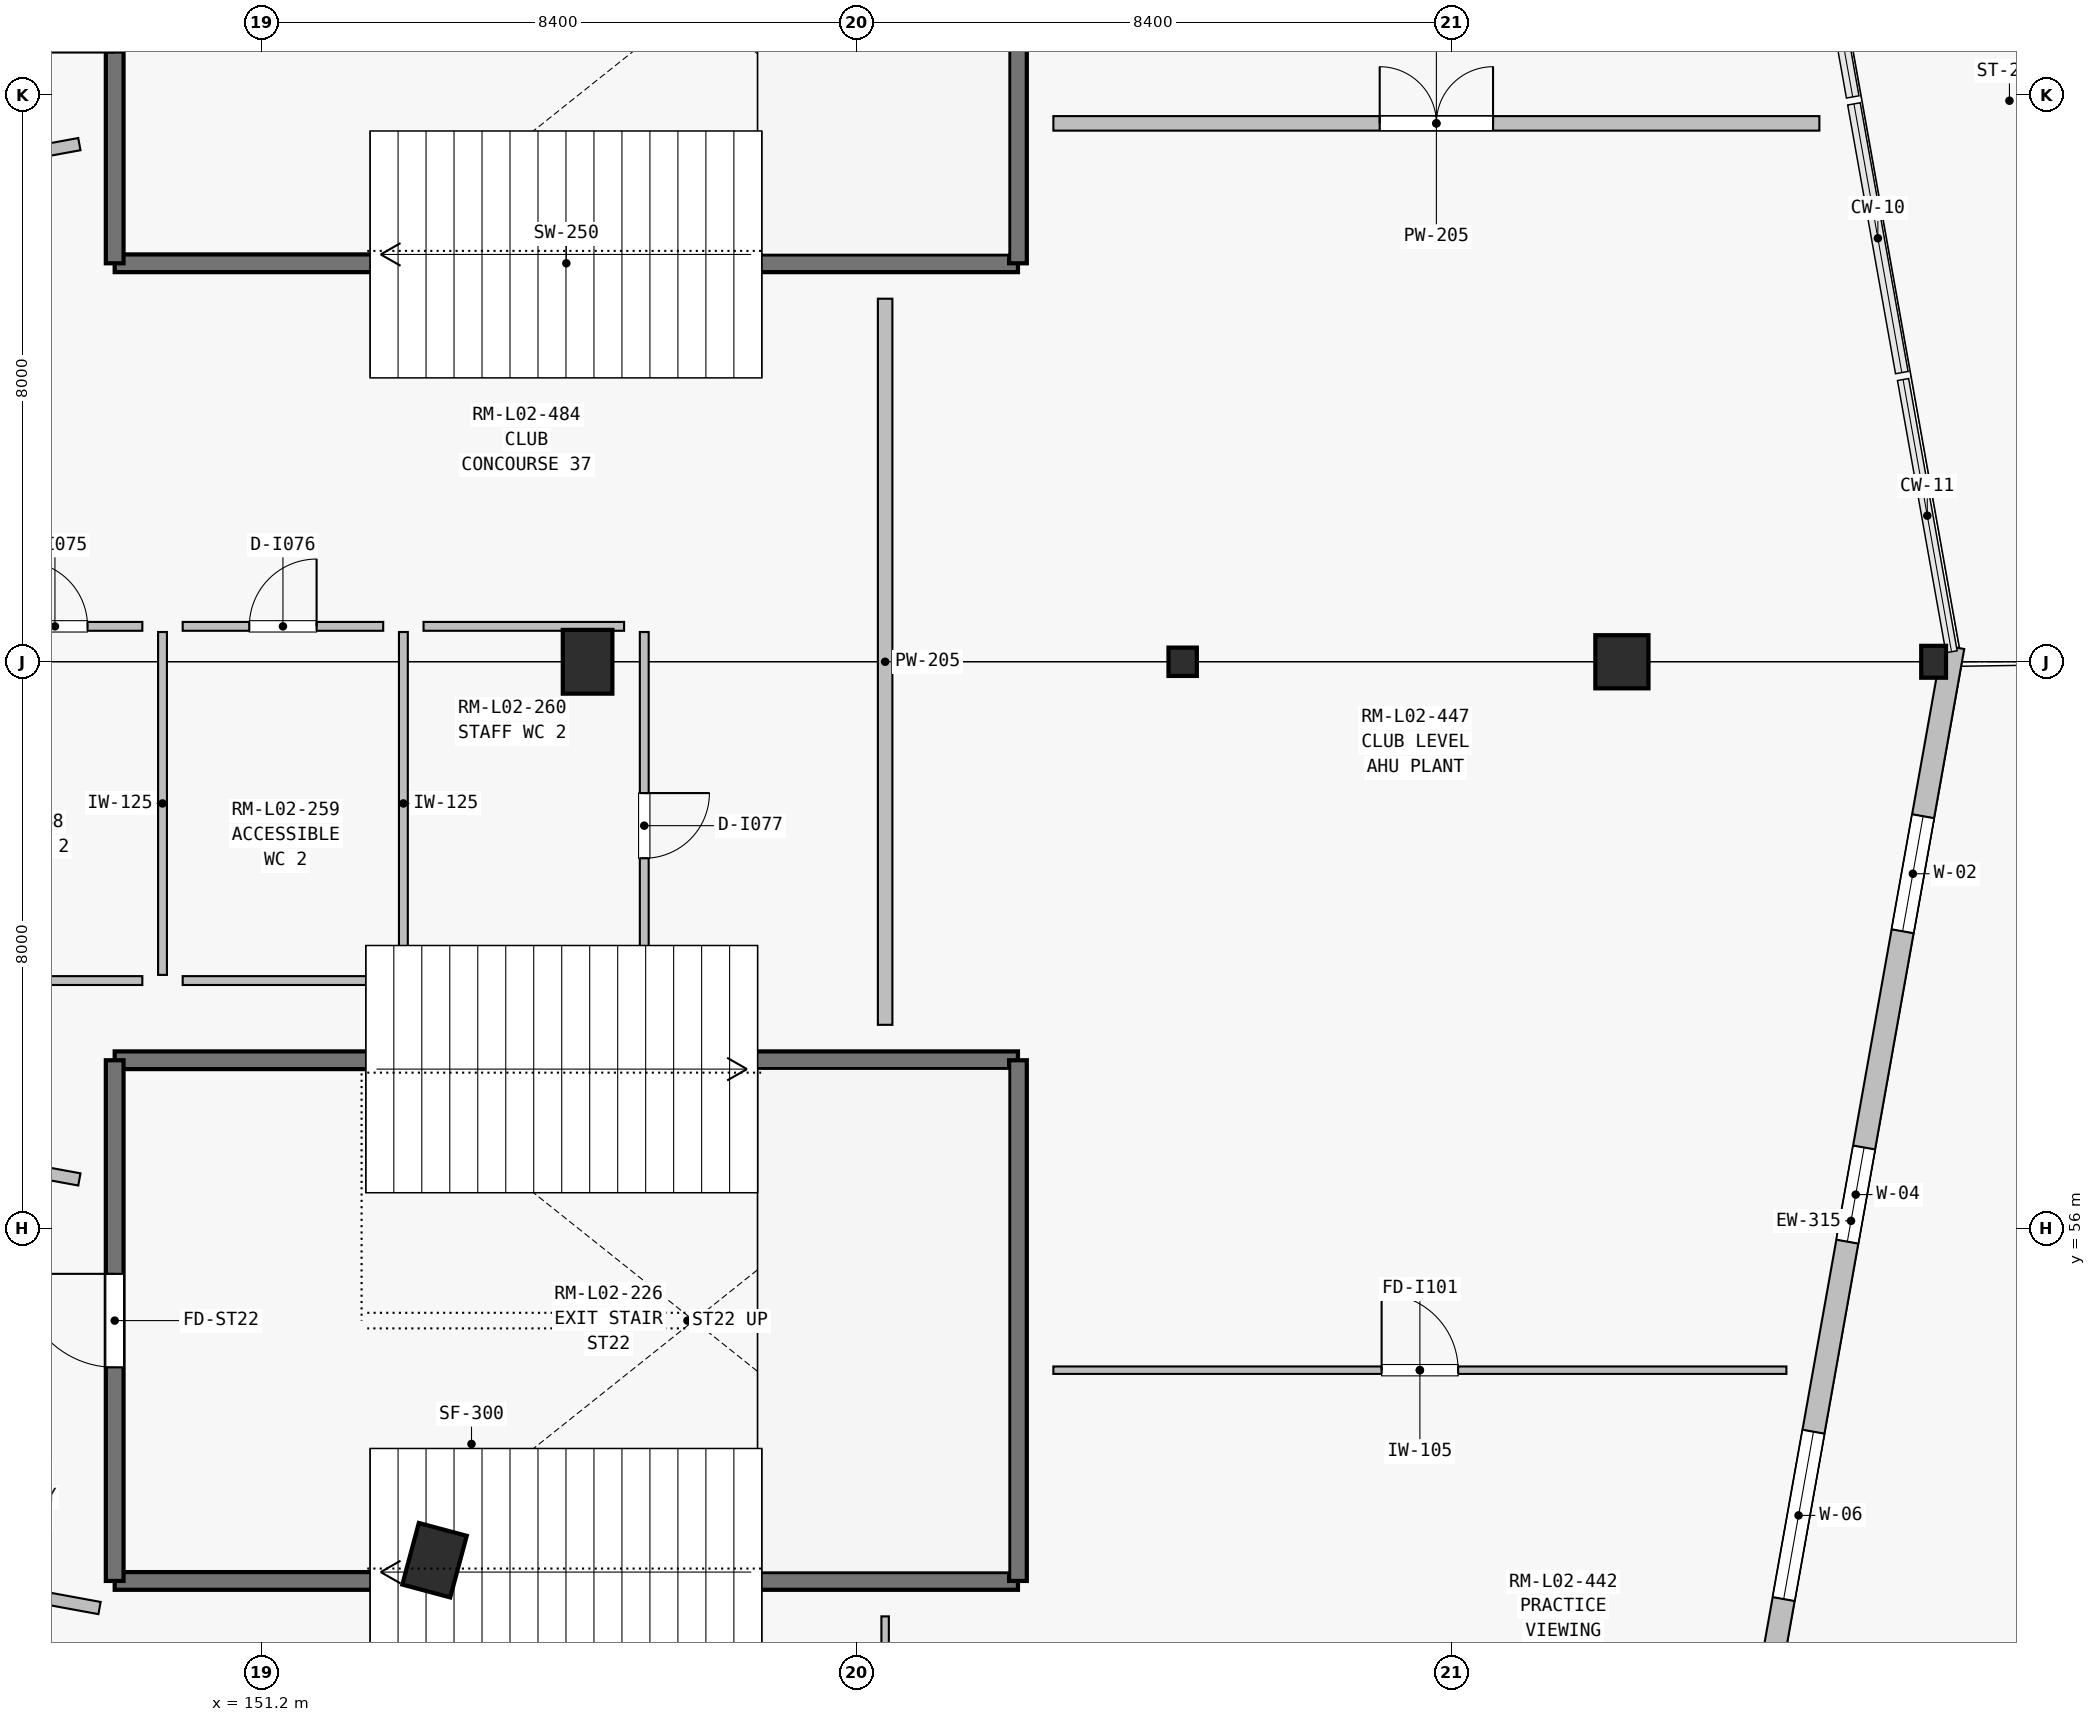
"""IFC4 building model, lengths in metres.
Left out: names, types, materials, properties, quantities, classifications, styles, units other than length and angle.
Written with IfcOpenShell. Run it as: python <this file> out.ifc"""

import sys

from ifc_helpers import new_model, si_unit, direction, frame, frame_2d, origin, origin_2d, place, context, subcontext, project, spatial, rectangle, i_section, extrude, element, fill, save


model = new_model("IFC4")
c1 = context("Model", 3, precision=1e-05, world=origin(), true_north=direction((0.0, 1.0)))
c2 = subcontext(c1, "Body", "Model", "MODEL_VIEW")
j1 = project(units=[si_unit("LENGTHUNIT", "METRE"), si_unit("PLANEANGLEUNIT", "RADIAN")], contexts=[c1])
p1 = place(None, origin())
s1 = spatial("IfcSite", under=j1, at=p1, CompositionType="ELEMENT")
p2 = place(p1, origin())
s2 = spatial("IfcBuilding", under=s1, at=p2, CompositionType="ELEMENT")
p3 = place(p2, frame((0.0, 0.0, 9.9)))
s3 = spatial("IfcBuildingStorey", under=s2, at=p3, CompositionType="ELEMENT", Elevation=9.9)
for number, where, z_axis, x_axis in (
    (1, (155.8, 64.0, 0.0), (0.0, 0.0, 1.0), (1.0, 0.0, 0.0)),
    (2, (153.64, 51.318, 0.0), (0.0, 0.0, 1.0), (0.966, -0.259, 0.0)),
):
    element("IfcColumn", number, at=place(p3, frame(where, z_axis=z_axis, x_axis=x_axis)), inside=s3, PredefinedType="COLUMN", context=c2, shape_type="SweptSolid", body=[
        extrude(rectangle(XDim=0.7, YDim=0.9, at=origin_2d()), origin(), (0.0, 0.0, 1.0), 4.5),
    ])
p4 = place(p3, frame((164.2, 64.0, 0.0), z_axis=(0.0, 0.0, 1.0), x_axis=(1.0, 0.0, 0.0)))
e3 = element("IfcColumn", 3, at=p4, inside=s3, PredefinedType="COLUMN", context=c2, shape_type="SweptSolid", body=[
    extrude(i_section(OverallWidth=0.4, OverallDepth=0.4, WebThickness=0.016, FlangeThickness=0.028, at=origin_2d()), origin(), (0.0, 0.0, 1.0), 4.5),
])
p5 = place(p3, frame((170.4, 64.0, 0.0), z_axis=(0.0, 0.0, 1.0), x_axis=(1.0, 0.0, 0.0)))
e4 = element("IfcColumn", 4, at=p5, inside=s3, PredefinedType="COLUMN", context=c2, shape_type="SweptSolid", body=[
    extrude(rectangle(XDim=0.75, YDim=0.75, at=origin_2d()), origin(), (0.0, 0.0, 1.0), 4.5),
])
p6 = place(p3, frame((174.8, 64.0, 0.0), z_axis=(0.0, 0.0, 1.0), x_axis=(1.0, 0.0, 0.0)))
e5 = element("IfcColumn", 5, at=p6, inside=s3, PredefinedType="PILASTER", context=c2, shape_type="SweptSolid", body=[
    extrude(rectangle(XDim=0.35, YDim=0.45, at=origin_2d()), origin(), (0.0, 0.0, 1.0), 5.45),
])
p7 = place(p3, frame((175.077, 64.208, 0.0), z_axis=(0.0, 0.0, 1.0), x_axis=(-0.175348469708, -0.984506431757, 0.0)))
e6 = element("IfcWall", 6, at=p7, inside=s3, PredefinedType="SOLIDWALL", context=c2, shape_type="SweptSolid", body=[
    extrude(rectangle(XDim=16.454, YDim=0.315, at=frame_2d((8.227, 0.0))), origin(), (0.0, 0.0, 1.0), 4.26),
])
p8 = place(p7, frame((2.425, 0.0, 0.75)))
e7 = element("IfcOpeningElement", 7, at=p8, cuts=e6, PredefinedType="OPENING", context=c2, shape_type="SweptSolid", body=[
    extrude(rectangle(XDim=1.65, YDim=2.4, at=frame_2d((0.825, 1.2))), frame((0.0, 0.167, 0.0), z_axis=(0.0, -1.0, 0.0), x_axis=(1.0, 0.0, 0.0)), (0.0, 0.0, 1.0), 0.335),
])
p9 = place(p7, frame((7.175, 0.0, 0.75)))
e8 = element("IfcOpeningElement", 8, at=p9, cuts=e6, PredefinedType="OPENING", context=c2, shape_type="SweptSolid", body=[
    extrude(rectangle(XDim=1.35, YDim=2.3, at=frame_2d((0.675, 1.15))), frame((0.0, 0.167, 0.0), z_axis=(0.0, -1.0, 0.0), x_axis=(1.0, 0.0, 0.0)), (0.0, 0.0, 1.0), 0.335),
])
p10 = place(p7, frame((11.25, 0.0, 0.9)))
e9 = element("IfcOpeningElement", 9, at=p10, cuts=e6, PredefinedType="OPENING", context=c2, shape_type="SweptSolid", body=[
    extrude(rectangle(XDim=2.4, YDim=2.1, at=frame_2d((1.2, 1.05))), frame((0.0, 0.167, 0.0), z_axis=(0.0, -1.0, 0.0), x_axis=(1.0, 0.0, 0.0)), (0.0, 0.0, 1.0), 0.335),
])
p11 = place(p3, frame((149.125, 69.625, 0.0), z_axis=(0.0, 0.0, 1.0), x_axis=(1.0, 0.0, 0.0)))
e10 = element("IfcWall", 10, at=p11, inside=s3, PredefinedType="SHEAR", context=c2, shape_type="SweptSolid", body=[
    extrude(rectangle(XDim=12.75, YDim=0.25, at=frame_2d((6.375, 0.0))), origin(), (0.0, 0.0, 1.0), 4.5),
])
p12 = place(p3, frame((149.125, 69.625, 0.0), z_axis=(0.0, 0.0, 1.0), x_axis=(0.0, 1.0, 0.0)))
e11 = element("IfcWall", 11, at=p12, inside=s3, PredefinedType="SHEAR", context=c2, shape_type="SweptSolid", body=[
    extrude(rectangle(XDim=7.35, YDim=0.25, at=frame_2d((3.675, 0.0))), origin(), (0.0, 0.0, 1.0), 4.5),
])
p13 = place(p12, frame((2.975, 0.0, 0.0)))
e12 = element("IfcOpeningElement", 12, at=p13, cuts=e11, PredefinedType="OPENING", context=c2, shape_type="SweptSolid", body=[
    extrude(rectangle(XDim=1.4, YDim=2.2, at=frame_2d((0.7, 1.1))), frame((0.0, 0.135, 0.0), z_axis=(0.0, -1.0, 0.0), x_axis=(1.0, 0.0, 0.0)), (0.0, 0.0, 1.0), 0.27),
])
p14 = place(p3, frame((161.875, 69.625, 0.0), z_axis=(0.0, 0.0, 1.0), x_axis=(0.0, 1.0, 0.0)))
e13 = element("IfcWall", 13, at=p14, inside=s3, PredefinedType="SHEAR", context=c2, shape_type="SweptSolid", body=[
    extrude(rectangle(XDim=7.35, YDim=0.25, at=frame_2d((3.675, 0.0))), origin(), (0.0, 0.0, 1.0), 4.5),
])
for number, where, z_axis, x_axis in (
    (14, (149.125, 51.025, 0.0), (0.0, 0.0, 1.0), (1.0, 0.0, 0.0)),
    (15, (149.125, 58.375, 0.0), (0.0, 0.0, 1.0), (1.0, 0.0, 0.0)),
):
    element("IfcWall", number, at=place(p3, frame(where, z_axis=z_axis, x_axis=x_axis)), inside=s3, PredefinedType="SHEAR", context=c2, shape_type="SweptSolid", body=[
        extrude(rectangle(XDim=12.75, YDim=0.25, at=frame_2d((6.375, 0.0))), origin(), (0.0, 0.0, 1.0), 4.5),
    ])
p15 = place(p3, frame((149.125, 51.025, 0.0), z_axis=(0.0, 0.0, 1.0), x_axis=(0.0, 1.0, 0.0)))
e16 = element("IfcWall", 16, at=p15, inside=s3, PredefinedType="SHEAR", context=c2, shape_type="SweptSolid", body=[
    extrude(rectangle(XDim=7.35, YDim=0.25, at=frame_2d((3.675, 0.0))), origin(), (0.0, 0.0, 1.0), 4.5),
])
p16 = place(p15, frame((3.015, 0.0, 0.0)))
e17 = element("IfcOpeningElement", 17, at=p16, cuts=e16, PredefinedType="OPENING", context=c2, shape_type="SweptSolid", body=[
    extrude(rectangle(XDim=1.32, YDim=2.2, at=frame_2d((0.66, 1.1))), frame((0.0, 0.135, 0.0), z_axis=(0.0, -1.0, 0.0), x_axis=(1.0, 0.0, 0.0)), (0.0, 0.0, 1.0), 0.27),
])
p17 = place(p3, frame((161.875, 51.025, 0.0), z_axis=(0.0, 0.0, 1.0), x_axis=(0.0, 1.0, 0.0)))
e18 = element("IfcWall", 18, at=p17, inside=s3, PredefinedType="SHEAR", context=c2, shape_type="SweptSolid", body=[
    extrude(rectangle(XDim=7.35, YDim=0.25, at=frame_2d((3.675, 0.0))), origin(), (0.0, 0.0, 1.0), 4.5),
])
p18 = place(p3, frame((149.8, 64.42, 0.0), z_axis=(0.0, 0.0, 1.0), x_axis=(0.0, -1.0, 0.0)))
e19 = element("IfcWall", 19, at=p18, inside=s3, PredefinedType="PARTITIONING", context=c2, shape_type="SweptSolid", body=[
    extrude(rectangle(XDim=4.84, YDim=0.125, at=frame_2d((2.42, 0.0))), origin(), (0.0, 0.0, 1.0), 3.627),
])
p19 = place(p3, frame((149.515, 59.5, 0.0), z_axis=(0.0, 0.0, 1.0), x_axis=(-1.0, 0.0, 0.0)))
e20 = element("IfcWall", 20, at=p19, inside=s3, PredefinedType="PARTITIONING", context=c2, shape_type="SweptSolid", body=[
    extrude(rectangle(XDim=3.83, YDim=0.125, at=frame_2d((1.915, 0.0))), origin(), (0.0, 0.0, 1.0), 3.245),
])
p20 = place(p3, frame((145.62, 64.5, 0.0), z_axis=(0.0, 0.0, 1.0), x_axis=(1.0, 0.0, 0.0)))
e21 = element("IfcWall", 21, at=p20, inside=s3, PredefinedType="PARTITIONING", context=c2, shape_type="SweptSolid", body=[
    extrude(rectangle(XDim=3.895, YDim=0.125, at=frame_2d((1.948, 0.0))), origin(), (0.0, 0.0, 1.0), 3.245),
])
p21 = place(p20, frame((2.202, 0.0, 0.0)))
e22 = element("IfcOpeningElement", 22, at=p21, cuts=e21, PredefinedType="OPENING", context=c2, shape_type="SweptSolid", body=[
    extrude(rectangle(XDim=0.92, YDim=2.1, at=frame_2d((0.46, 1.05))), frame((0.0, 0.073, 0.0), z_axis=(0.0, -1.0, 0.0), x_axis=(1.0, 0.0, 0.0)), (0.0, 0.0, 1.0), 0.145),
])
p22 = place(p3, frame((153.2, 64.42, 0.0), z_axis=(0.0, 0.0, 1.0), x_axis=(0.0, -1.0, 0.0)))
e23 = element("IfcWall", 23, at=p22, inside=s3, PredefinedType="PARTITIONING", context=c2, shape_type="SweptSolid", body=[
    extrude(rectangle(XDim=4.84, YDim=0.125, at=frame_2d((2.42, 0.0))), origin(), (0.0, 0.0, 1.0), 3.627),
])
p23 = place(p3, frame((152.915, 59.5, 0.0), z_axis=(0.0, 0.0, 1.0), x_axis=(-1.0, 0.0, 0.0)))
e24 = element("IfcWall", 24, at=p23, inside=s3, PredefinedType="PARTITIONING", context=c2, shape_type="SweptSolid", body=[
    extrude(rectangle(XDim=2.831, YDim=0.125, at=frame_2d((1.415, 0.0))), origin(), (0.0, 0.0, 1.0), 4.18),
])
p24 = place(p3, frame((150.085, 64.5, 0.0), z_axis=(0.0, 0.0, 1.0), x_axis=(1.0, 0.0, 0.0)))
e25 = element("IfcWall", 25, at=p24, inside=s3, PredefinedType="PARTITIONING", context=c2, shape_type="SweptSolid", body=[
    extrude(rectangle(XDim=2.831, YDim=0.125, at=frame_2d((1.415, 0.0))), origin(), (0.0, 0.0, 1.0), 4.2),
])
p25 = place(p24, frame((0.94, 0.0, 0.0)))
e26 = element("IfcOpeningElement", 26, at=p25, cuts=e25, PredefinedType="OPENING", context=c2, shape_type="SweptSolid", body=[
    extrude(rectangle(XDim=0.95, YDim=2.1, at=frame_2d((0.475, 1.05))), frame((0.0, 0.073, 0.0), z_axis=(0.0, -1.0, 0.0), x_axis=(1.0, 0.0, 0.0)), (0.0, 0.0, 1.0), 0.145),
])
p26 = place(p3, frame((156.6, 64.42, 0.0), z_axis=(0.0, 0.0, 1.0), x_axis=(0.0, -1.0, 0.0)))
e27 = element("IfcWall", 27, at=p26, inside=s3, PredefinedType="PARTITIONING", context=c2, shape_type="SweptSolid", body=[
    extrude(rectangle(XDim=4.84, YDim=0.125, at=frame_2d((2.42, 0.0))), origin(), (0.0, 0.0, 1.0), 3.627),
])
p27 = place(p26, frame((2.274, 0.0, 0.0)))
e28 = element("IfcOpeningElement", 28, at=p27, cuts=e27, PredefinedType="OPENING", context=c2, shape_type="SweptSolid", body=[
    extrude(rectangle(XDim=0.92, YDim=2.1, at=frame_2d((0.46, 1.05))), frame((0.0, 0.073, 0.0), z_axis=(0.0, -1.0, 0.0), x_axis=(1.0, 0.0, 0.0)), (0.0, 0.0, 1.0), 0.145),
])
p28 = place(p3, frame((156.315, 59.5, 0.0), z_axis=(0.0, 0.0, 1.0), x_axis=(-1.0, 0.0, 0.0)))
e29 = element("IfcWall", 29, at=p28, inside=s3, PredefinedType="PARTITIONING", context=c2, shape_type="SweptSolid", body=[
    extrude(rectangle(XDim=2.83, YDim=0.125, at=frame_2d((1.415, 0.0))), origin(), (0.0, 0.0, 1.0), 4.18),
])
p29 = place(p3, frame((153.485, 64.5, 0.0), z_axis=(0.0, 0.0, 1.0), x_axis=(1.0, 0.0, 0.0)))
e30 = element("IfcWall", 30, at=p29, inside=s3, PredefinedType="PARTITIONING", context=c2, shape_type="SweptSolid", body=[
    extrude(rectangle(XDim=2.83, YDim=0.125, at=frame_2d((1.415, 0.0))), origin(), (0.0, 0.0, 1.0), 4.2),
])
p30 = place(p3, frame((148.626, 71.307, 0.0), z_axis=(0.0, 0.0, 1.0), x_axis=(-0.983601501443, -0.180355444494, 0.0)))
e31 = element("IfcWall", 31, at=p30, inside=s3, PredefinedType="PARTITIONING", context=c2, shape_type="SweptSolid", body=[
    extrude(rectangle(XDim=1.856, YDim=0.175, at=frame_2d((0.928, 0.0))), origin(), (0.0, 0.0, 1.0), 4.2),
])
p31 = place(p3, frame((148.911, 50.642, 0.0), z_axis=(0.0, 0.0, 1.0), x_axis=(-0.983611030529, 0.180303468135, 0.0)))
e32 = element("IfcWall", 32, at=p31, inside=s3, PredefinedType="PARTITIONING", context=c2, shape_type="SweptSolid", body=[
    extrude(rectangle(XDim=3.227, YDim=0.175, at=frame_2d((1.613, 0.0))), origin(), (0.0, 0.0, 1.0), 4.18),
])
p32 = place(p3, frame((147.002, 56.99, 0.0), z_axis=(0.0, 0.0, 1.0), x_axis=(0.983620542505, -0.18025156965, 0.0)))
e33 = element("IfcWall", 33, at=p32, inside=s3, PredefinedType="PARTITIONING", context=c2, shape_type="SweptSolid", body=[
    extrude(rectangle(XDim=1.651, YDim=0.175, at=frame_2d((0.826, 0.0))), origin(), (0.0, 0.0, 1.0), 4.18),
])
p33 = place(p3, frame((160.0, 48.725, 0.0), z_axis=(0.0, 0.0, 1.0), x_axis=(0.0, 1.0, 0.0)))
e34 = element("IfcWall", 34, at=p33, inside=s3, PredefinedType="PARTITIONING", context=c2, shape_type="SweptSolid", body=[
    extrude(rectangle(XDim=1.8, YDim=0.105, at=frame_2d((0.9, 0.0))), origin(), (0.0, 0.0, 1.0), 4.18),
])
p34 = place(p3, frame((162.375, 54.0, 0.0), z_axis=(0.0, 0.0, 1.0), x_axis=(1.0, 0.0, 0.0)))
e35 = element("IfcWall", 35, at=p34, inside=s3, PredefinedType="PARTITIONING", context=c2, shape_type="SweptSolid", body=[
    extrude(rectangle(XDim=10.347, YDim=0.105, at=frame_2d((5.173, 0.0))), origin(), (0.0, 0.0, 1.0), 3.245),
])
p35 = place(p34, frame((4.633, 0.0, 0.0)))
e36 = element("IfcOpeningElement", 36, at=p35, cuts=e35, PredefinedType="OPENING", context=c2, shape_type="SweptSolid", body=[
    extrude(rectangle(XDim=1.08, YDim=2.15, at=frame_2d((0.54, 1.075))), frame((0.0, 0.062, 0.0), z_axis=(0.0, -1.0, 0.0), x_axis=(1.0, 0.0, 0.0)), (0.0, 0.0, 1.0), 0.125),
])
p36 = place(p3, frame((162.375, 71.6, 0.0), z_axis=(0.0, 0.0, 1.0), x_axis=(1.0, 0.0, 0.0)))
e37 = element("IfcWall", 37, at=p36, inside=s3, PredefinedType="SOLIDWALL", context=c2, shape_type="SweptSolid", body=[
    extrude(rectangle(XDim=10.812, YDim=0.205, at=frame_2d((5.406, 0.0))), origin(), (0.0, 0.0, 1.0), 3.245),
])
p37 = place(p36, frame((4.606, 0.0, 0.0)))
e38 = element("IfcOpeningElement", 38, at=p37, cuts=e37, PredefinedType="OPENING", context=c2, shape_type="SweptSolid", body=[
    extrude(rectangle(XDim=1.6, YDim=2.35, at=frame_2d((0.8, 1.175))), frame((0.0, 0.113, 0.0), z_axis=(0.0, -1.0, 0.0), x_axis=(1.0, 0.0, 0.0)), (0.0, 0.0, 1.0), 0.225),
])
p38 = place(p3, frame((160.0, 58.875, 0.0), z_axis=(0.0, 0.0, 1.0), x_axis=(0.0, 1.0, 0.0)))
e39 = element("IfcWall", 39, at=p38, inside=s3, PredefinedType="SOLIDWALL", context=c2, shape_type="SweptSolid", body=[
    extrude(rectangle(XDim=10.25, YDim=0.205, at=frame_2d((5.125, 0.0))), origin(), (0.0, 0.0, 1.0), 3.627),
])
p39 = place(p8, origin())
e40 = element("IfcWindow", 40, at=p39, inside=s3, PartitioningType="SINGLE_PANEL", PredefinedType="WINDOW", context=c2, shape_type="SweptSolid", body=[
    extrude(rectangle(XDim=1.65, YDim=2.4, at=frame_2d((0.825, 1.2))), frame((0.0, 0.03, 0.0), z_axis=(0.0, -1.0, 0.0), x_axis=(1.0, 0.0, 0.0)), (0.0, 0.0, 1.0), 0.06),
])
fill(e7, e40)
p40 = place(p9, origin())
e41 = element("IfcWindow", 41, at=p40, inside=s3, PartitioningType="SINGLE_PANEL", PredefinedType="WINDOW", context=c2, shape_type="SweptSolid", body=[
    extrude(rectangle(XDim=1.35, YDim=2.3, at=frame_2d((0.675, 1.15))), frame((0.0, 0.03, 0.0), z_axis=(0.0, -1.0, 0.0), x_axis=(1.0, 0.0, 0.0)), (0.0, 0.0, 1.0), 0.06),
])
fill(e8, e41)
p41 = place(p10, origin())
e42 = element("IfcWindow", 42, at=p41, inside=s3, PartitioningType="SINGLE_PANEL", PredefinedType="WINDOW", context=c2, shape_type="SweptSolid", body=[
    extrude(rectangle(XDim=2.4, YDim=2.1, at=frame_2d((1.2, 1.05))), frame((0.0, 0.03, 0.0), z_axis=(0.0, -1.0, 0.0), x_axis=(1.0, 0.0, 0.0)), (0.0, 0.0, 1.0), 0.06),
])
fill(e9, e42)
p42 = place(p16, origin())
e43 = element("IfcDoor", 43, at=p42, inside=s3, OperationType="SINGLE_SWING_RIGHT", PredefinedType="DOOR", context=c2, shape_type="SweptSolid", body=[
    extrude(rectangle(XDim=1.32, YDim=2.2, at=frame_2d((0.66, 1.1))), frame((0.0, 0.025, 0.0), z_axis=(0.0, -1.0, 0.0), x_axis=(1.0, 0.0, 0.0)), (0.0, 0.0, 1.0), 0.05),
])
fill(e17, e43)
p43 = place(p21, origin())
e44 = element("IfcDoor", 44, at=p43, inside=s3, OperationType="SINGLE_SWING_LEFT", PredefinedType="DOOR", context=c2, shape_type="SweptSolid", body=[
    extrude(rectangle(XDim=0.92, YDim=2.1, at=frame_2d((0.46, 1.05))), frame((0.0, 0.025, 0.0), z_axis=(0.0, -1.0, 0.0), x_axis=(1.0, 0.0, 0.0)), (0.0, 0.0, 1.0), 0.05),
])
fill(e22, e44)
p44 = place(p25, origin())
e45 = element("IfcDoor", 45, at=p44, inside=s3, OperationType="SINGLE_SWING_RIGHT", PredefinedType="DOOR", context=c2, shape_type="SweptSolid", body=[
    extrude(rectangle(XDim=0.95, YDim=2.1, at=frame_2d((0.475, 1.05))), frame((0.0, 0.025, 0.0), z_axis=(0.0, -1.0, 0.0), x_axis=(1.0, 0.0, 0.0)), (0.0, 0.0, 1.0), 0.05),
])
fill(e26, e45)
p45 = place(p27, origin())
e46 = element("IfcDoor", 46, at=p45, inside=s3, OperationType="SINGLE_SWING_LEFT", PredefinedType="DOOR", context=c2, shape_type="SweptSolid", body=[
    extrude(rectangle(XDim=0.92, YDim=2.1, at=frame_2d((0.46, 1.05))), frame((0.0, 0.025, 0.0), z_axis=(0.0, -1.0, 0.0), x_axis=(1.0, 0.0, 0.0)), (0.0, 0.0, 1.0), 0.05),
])
fill(e28, e46)
p46 = place(p35, origin())
e47 = element("IfcDoor", 47, at=p46, inside=s3, OperationType="SINGLE_SWING_LEFT", PredefinedType="DOOR", context=c2, shape_type="SweptSolid", body=[
    extrude(rectangle(XDim=1.08, YDim=2.15, at=frame_2d((0.54, 1.075))), frame((0.0, 0.025, 0.0), z_axis=(0.0, -1.0, 0.0), x_axis=(1.0, 0.0, 0.0)), (0.0, 0.0, 1.0), 0.05),
])
fill(e36, e47)
p47 = place(p37, origin())
e48 = element("IfcDoor", 48, at=p47, inside=s3, OperationType="DOUBLE_DOOR_SINGLE_SWING", PredefinedType="DOOR", context=c2, shape_type="SweptSolid", body=[
    extrude(rectangle(XDim=1.6, YDim=2.35, at=frame_2d((0.8, 1.175))), frame((0.0, 0.025, 0.0), z_axis=(0.0, -1.0, 0.0), x_axis=(1.0, 0.0, 0.0)), (0.0, 0.0, 1.0), 0.05),
])
fill(e38, e48)
save(model, sys.argv[1])
